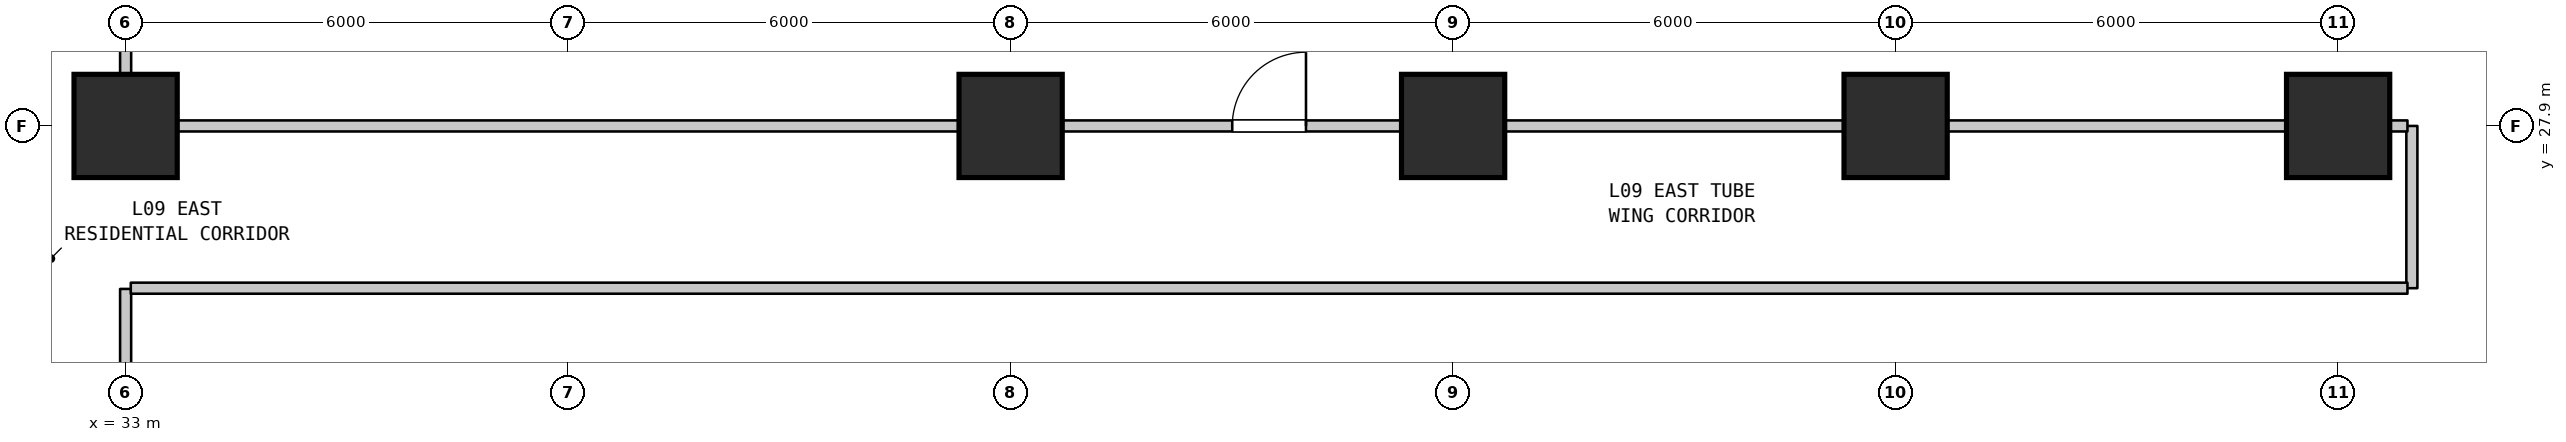
"""IFC4 building model, lengths in metres.
Left out: names, types, materials, properties, quantities, classifications, styles, units other than length and angle.
Written with IfcOpenShell. Run it as: python <this file> out.ifc"""

import sys

from ifc_helpers import new_model, si_unit, direction, frame, frame_2d, origin, origin_2d, place, context, subcontext, project, spatial, rectangle, extrude, element, fill, save


model = new_model("IFC4")
c1 = context("Model", 3, precision=1e-05, world=origin(), true_north=direction((0.0, 1.0)))
c2 = subcontext(c1, "Body", "Model", "MODEL_VIEW")
j1 = project(units=[si_unit("LENGTHUNIT", "METRE"), si_unit("PLANEANGLEUNIT", "RADIAN")], contexts=[c1])
p1 = place(None, origin())
s1 = spatial("IfcSite", under=j1, at=p1, CompositionType="ELEMENT")
p2 = place(p1, origin())
s2 = spatial("IfcBuilding", under=s1, at=p2, CompositionType="ELEMENT")
p3 = place(p2, frame((0.0, 0.0, 42.5)))
s3 = spatial("IfcBuildingStorey", under=s2, at=p3, CompositionType="ELEMENT", Elevation=42.5)
for number, where, z_axis, x_axis in (
    (1, (33.0, 27.9, 0.0), (0.0, 0.0, 1.0), (1.0, 0.0, 0.0)),
    (2, (45.0, 27.9, 0.0), (0.0, 0.0, 1.0), (1.0, 0.0, 0.0)),
    (3, (51.0, 27.9, 0.0), (0.0, 0.0, 1.0), (1.0, 0.0, 0.0)),
    (4, (57.0, 27.9, 0.0), (0.0, 0.0, 1.0), (1.0, 0.0, 0.0)),
    (5, (63.0, 27.9, 0.0), (0.0, 0.0, 1.0), (1.0, 0.0, 0.0)),
):
    element("IfcColumn", number, at=place(p3, frame(where, z_axis=z_axis, x_axis=x_axis)), inside=s3, PredefinedType="COLUMN", context=c2, shape_type="SweptSolid", body=[
        extrude(rectangle(XDim=1.4, YDim=1.4, at=origin_2d()), origin(), (0.0, 0.0, 1.0), 3.7),
    ])
p4 = place(p3, frame((33.0, 19.66, 0.0), z_axis=(0.0, 0.0, 1.0), x_axis=(0.0, 1.0, 0.0)))
e6 = element("IfcWall", 6, at=p4, inside=s3, PredefinedType="STANDARD", context=c2, shape_type="SweptSolid", body=[
    extrude(rectangle(XDim=6.03, YDim=0.15, at=frame_2d((3.015, 0.0))), origin(), (0.0, 0.0, 1.0), 2.885),
])
p5 = place(p3, frame((33.0, 27.91, 0.0), z_axis=(0.0, 0.0, 1.0), x_axis=(0.0, 1.0, 0.0)))
e7 = element("IfcWall", 7, at=p5, inside=s3, PredefinedType="STANDARD", context=c2, shape_type="SweptSolid", body=[
    extrude(rectangle(XDim=9.98, YDim=0.15, at=frame_2d((4.99, 0.0))), origin(), (0.0, 0.0, 1.0), 2.885),
])
p6 = place(p3, frame((64.0, 25.7, 0.0), z_axis=(0.0, 0.0, 1.0), x_axis=(0.0, 1.0, 0.0)))
e8 = element("IfcWall", 8, at=p6, inside=s3, PredefinedType="STANDARD", context=c2, shape_type="SweptSolid", body=[
    extrude(rectangle(XDim=2.2, YDim=0.15, at=frame_2d((1.1, 0.0))), origin(), (0.0, 0.0, 1.0), 3.385),
])
p7 = place(p3, frame((33.07, 25.7, 0.0), z_axis=(0.0, 0.0, 1.0), x_axis=(1.0, 0.0, 0.0)))
e9 = element("IfcWall", 9, at=p7, inside=s3, PredefinedType="STANDARD", context=c2, shape_type="SweptSolid", body=[
    extrude(rectangle(XDim=30.87, YDim=0.15, at=frame_2d((15.435, 0.0))), origin(), (0.0, 0.0, 1.0), 3.385),
])
p8 = place(p3, frame((33.07, 27.9, 0.0), z_axis=(0.0, 0.0, 1.0), x_axis=(1.0, 0.0, 0.0)))
e10 = element("IfcWall", 10, at=p8, inside=s3, PredefinedType="STANDARD", context=c2, shape_type="SweptSolid", body=[
    extrude(rectangle(XDim=30.87, YDim=0.15, at=frame_2d((15.435, 0.0))), origin(), (0.0, 0.0, 1.0), 2.885),
])
p9 = place(p8, frame((14.935, 0.0, 0.0)))
e11 = element("IfcOpeningElement", 11, at=p9, cuts=e10, PredefinedType="OPENING", context=c2, shape_type="SweptSolid", body=[
    extrude(rectangle(XDim=1.0, YDim=2.15, at=frame_2d((0.5, 1.075))), frame((0.0, 0.085, 0.0), z_axis=(0.0, -1.0, 0.0), x_axis=(1.0, 0.0, 0.0)), (0.0, 0.0, 1.0), 0.17),
])
p10 = place(p9, origin())
e12 = element("IfcDoor", 12, at=p10, inside=s3, OperationType="SINGLE_SWING_RIGHT", PredefinedType="DOOR", context=c2, shape_type="SweptSolid", body=[
    extrude(rectangle(XDim=1.0, YDim=2.15, at=frame_2d((0.5, 1.075))), frame((0.0, 0.025, 0.0), z_axis=(0.0, -1.0, 0.0), x_axis=(1.0, 0.0, 0.0)), (0.0, 0.0, 1.0), 0.05),
])
fill(e11, e12)
save(model, sys.argv[1])
